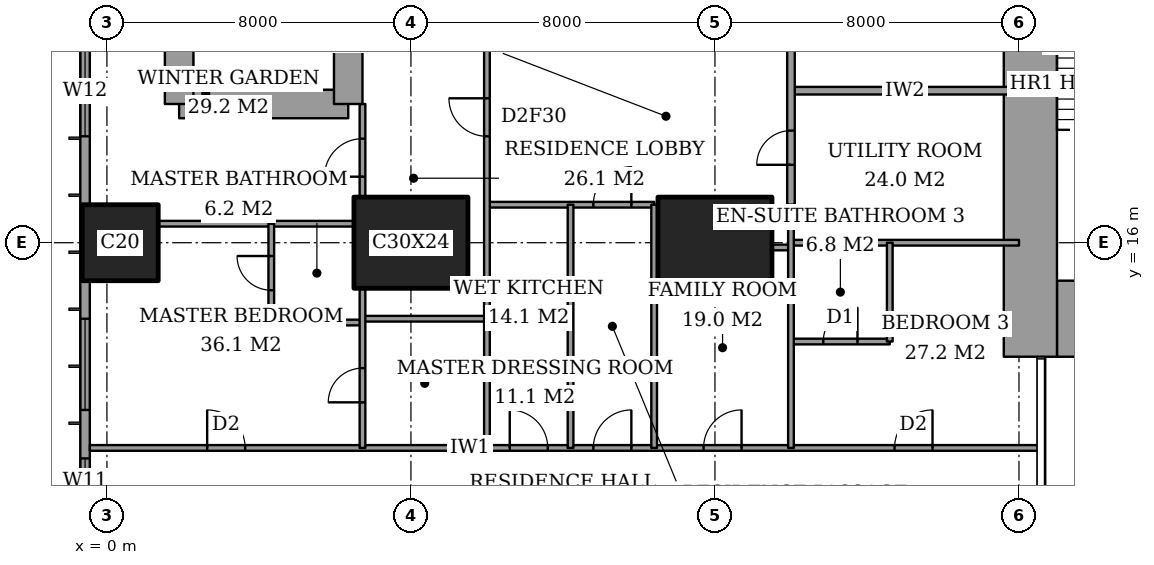
"""IFC4 building model, lengths in metres.
Left out: names, types, materials, properties, quantities, classifications, styles, units other than length and angle.
Written with IfcOpenShell. Run it as: python <this file> out.ifc"""

import sys

from ifc_helpers import new_model, si_unit, direction, frame, frame_2d, origin, origin_2d, place, context, subcontext, project, spatial, rectangle, extrude, element, fill, save


model = new_model("IFC4")
c1 = context("Model", 3, precision=1e-05, world=origin(), true_north=direction((0.0, 1.0)))
c2 = subcontext(c1, "Body", "Model", "MODEL_VIEW")
j1 = project(units=[si_unit("LENGTHUNIT", "METRE"), si_unit("PLANEANGLEUNIT", "RADIAN")], contexts=[c1])
p1 = place(None, origin())
s1 = spatial("IfcSite", under=j1, at=p1, CompositionType="ELEMENT")
p2 = place(p1, origin())
s2 = spatial("IfcBuilding", under=s1, at=p2, CompositionType="ELEMENT")
p3 = place(p2, frame((0.0, 0.0, 139.4)))
s3 = spatial("IfcBuildingStorey", under=s2, at=p3, CompositionType="ELEMENT", Elevation=139.4)
p4 = place(p3, frame((0.35, 16.0, 0.0), z_axis=(0.0, 0.0, 1.0), x_axis=(1.0, 0.0, 0.0)))
e1 = element("IfcColumn", 1, at=p4, inside=s3, PredefinedType="COLUMN", context=c2, shape_type="SweptSolid", body=[
    extrude(rectangle(XDim=2.0, YDim=2.0, at=origin_2d()), origin(), (0.0, 0.0, 1.0), 3.6),
])
for number, where, z_axis, x_axis in (
    (2, (8.0, 16.0, 0.0), (0.0, 0.0, 1.0), (1.0, 0.0, 0.0)),
    (3, (16.0, 16.0, 0.0), (0.0, 0.0, 1.0), (1.0, 0.0, 0.0)),
):
    element("IfcColumn", number, at=place(p3, frame(where, z_axis=z_axis, x_axis=x_axis)), inside=s3, PredefinedType="COLUMN", context=c2, shape_type="SweptSolid", body=[
        extrude(rectangle(XDim=3.0, YDim=2.4, at=origin_2d()), origin(), (0.0, 0.0, 1.0), 3.6),
    ])
p5 = place(p3, frame((25.0, 14.0, 0.0), z_axis=(0.0, 0.0, 1.0), x_axis=(1.0, 0.0, 0.0)))
e4 = element("IfcWall", 4, at=p5, inside=s3, PredefinedType="SHEAR", context=c2, shape_type="SweptSolid", body=[
    extrude(rectangle(XDim=3.15, YDim=2.0, at=frame_2d((1.575, 0.0))), origin(), (0.0, 0.0, 1.0), 3.6),
])
p6 = place(p3, frame((24.3, 13.0, 0.0), z_axis=(0.0, 0.0, 1.0), x_axis=(0.0, 1.0, 0.0)))
e5 = element("IfcWall", 5, at=p6, inside=s3, PredefinedType="SHEAR", context=c2, shape_type="SweptSolid", body=[
    extrude(rectangle(XDim=10.15, YDim=1.4, at=frame_2d((5.075, 0.0))), origin(), (0.0, 0.0, 1.0), 3.6),
])
p7 = place(p3, frame((1.9, 19.65, 0.0), z_axis=(0.0, 0.0, 1.0), x_axis=(1.0, 0.0, 0.0)))
e6 = element("IfcWall", 6, at=p7, inside=s3, PredefinedType="SHEAR", context=c2, shape_type="SweptSolid", body=[
    extrude(rectangle(XDim=4.45, YDim=0.75, at=frame_2d((2.225, 0.0))), origin(), (0.0, 0.0, 1.0), 3.6),
])
p8 = place(p3, frame((6.35, 19.65, 0.0), z_axis=(0.0, 0.0, 1.0), x_axis=(0.0, 1.0, 0.0)))
e7 = element("IfcWall", 7, at=p8, inside=s3, PredefinedType="SHEAR", context=c2, shape_type="SweptSolid", body=[
    extrude(rectangle(XDim=8.7, YDim=0.75, at=frame_2d((4.35, 0.0))), origin(), (0.0, 0.0, 1.0), 3.6),
])
p9 = place(p8, frame((6.725, 0.0, 0.0)))
e8 = element("IfcOpeningElement", 8, at=p9, cuts=e7, PredefinedType="OPENING", context=c2, shape_type="SweptSolid", body=[
    extrude(rectangle(XDim=1.0, YDim=2.1, at=frame_2d((0.5, 1.05))), frame((0.0, 0.385, 0.0), z_axis=(0.0, -1.0, 0.0), x_axis=(1.0, 0.0, 0.0)), (0.0, 0.0, 1.0), 0.77),
])
p10 = place(p3, frame((1.9, 28.35, 0.0), z_axis=(0.0, 0.0, 1.0), x_axis=(0.0, -1.0, 0.0)))
e9 = element("IfcWall", 9, at=p10, inside=s3, PredefinedType="SHEAR", context=c2, shape_type="SweptSolid", body=[
    extrude(rectangle(XDim=8.7, YDim=0.75, at=frame_2d((4.35, 0.0))), origin(), (0.0, 0.0, 1.0), 3.6),
])
p11 = place(p3, frame((-0.575, 44.825, 0.0), z_axis=(0.0, 0.0, 1.0), x_axis=(0.0, -1.0, 0.0)))
e10 = element("IfcWall", 10, at=p11, inside=s3, PredefinedType="SOLIDWALL", context=c2, shape_type="SweptSolid", body=[
    extrude(rectangle(XDim=41.65, YDim=0.25, at=frame_2d((20.825, 0.0))), origin(), (0.0, 0.0, 1.0), 3.6),
])
p12 = place(p11, frame((0.775, 0.0, 0.4)))
e11 = element("IfcOpeningElement", 11, at=p12, cuts=e10, PredefinedType="OPENING", context=c2, shape_type="SweptSolid", body=[
    extrude(rectangle(XDim=2.4, YDim=2.2, at=frame_2d((1.2, 1.1))), frame((0.0, 0.135, 0.0), z_axis=(0.0, -1.0, 0.0), x_axis=(1.0, 0.0, 0.0)), (0.0, 0.0, 1.0), 0.27),
])
p13 = place(p11, frame((6.1, 0.0, 0.4)))
e12 = element("IfcOpeningElement", 12, at=p13, cuts=e10, PredefinedType="OPENING", context=c2, shape_type="SweptSolid", body=[
    extrude(rectangle(XDim=1.2, YDim=2.2, at=frame_2d((0.6, 1.1))), frame((0.0, 0.135, 0.0), z_axis=(0.0, -1.0, 0.0), x_axis=(1.0, 0.0, 0.0)), (0.0, 0.0, 1.0), 0.27),
])
p14 = place(p11, frame((8.425, 0.0, 0.4)))
e13 = element("IfcOpeningElement", 13, at=p14, cuts=e10, PredefinedType="OPENING", context=c2, shape_type="SweptSolid", body=[
    extrude(rectangle(XDim=2.4, YDim=2.2, at=frame_2d((1.2, 1.1))), frame((0.0, 0.135, 0.0), z_axis=(0.0, -1.0, 0.0), x_axis=(1.0, 0.0, 0.0)), (0.0, 0.0, 1.0), 0.27),
])
p15 = place(p11, frame((15.625, 0.0, 0.4)))
e14 = element("IfcOpeningElement", 14, at=p15, cuts=e10, PredefinedType="OPENING", context=c2, shape_type="SweptSolid", body=[
    extrude(rectangle(XDim=2.4, YDim=2.2, at=frame_2d((1.2, 1.1))), frame((0.0, 0.135, 0.0), z_axis=(0.0, -1.0, 0.0), x_axis=(1.0, 0.0, 0.0)), (0.0, 0.0, 1.0), 0.27),
])
p16 = place(p11, frame((23.625, 0.0, 0.4)))
e15 = element("IfcOpeningElement", 15, at=p16, cuts=e10, PredefinedType="OPENING", context=c2, shape_type="SweptSolid", body=[
    extrude(rectangle(XDim=2.4, YDim=2.2, at=frame_2d((1.2, 1.1))), frame((0.0, 0.135, 0.0), z_axis=(0.0, -1.0, 0.0), x_axis=(1.0, 0.0, 0.0)), (0.0, 0.0, 1.0), 0.27),
])
p17 = place(p11, frame((30.825, 0.0, 0.4)))
e16 = element("IfcOpeningElement", 16, at=p17, cuts=e10, PredefinedType="OPENING", context=c2, shape_type="SweptSolid", body=[
    extrude(rectangle(XDim=2.4, YDim=2.2, at=frame_2d((1.2, 1.1))), frame((0.0, 0.135, 0.0), z_axis=(0.0, -1.0, 0.0), x_axis=(1.0, 0.0, 0.0)), (0.0, 0.0, 1.0), 0.27),
])
p18 = place(p11, frame((34.5, 0.0, 0.4)))
e17 = element("IfcOpeningElement", 17, at=p18, cuts=e10, PredefinedType="OPENING", context=c2, shape_type="SweptSolid", body=[
    extrude(rectangle(XDim=1.2, YDim=2.2, at=frame_2d((0.6, 1.1))), frame((0.0, 0.135, 0.0), z_axis=(0.0, -1.0, 0.0), x_axis=(1.0, 0.0, 0.0)), (0.0, 0.0, 1.0), 0.27),
])
p19 = place(p11, frame((38.475, 0.0, 0.4)))
e18 = element("IfcOpeningElement", 18, at=p19, cuts=e10, PredefinedType="OPENING", context=c2, shape_type="SweptSolid", body=[
    extrude(rectangle(XDim=2.4, YDim=2.2, at=frame_2d((1.2, 1.1))), frame((0.0, 0.135, 0.0), z_axis=(0.0, -1.0, 0.0), x_axis=(1.0, 0.0, 0.0)), (0.0, 0.0, 1.0), 0.27),
])
p20 = place(p3, frame((-0.45, 10.6, 0.0), z_axis=(0.0, 0.0, 1.0), x_axis=(1.0, 0.0, 0.0)))
e19 = element("IfcWall", 19, at=p20, inside=s3, PredefinedType="PARTITIONING", context=c2, shape_type="SweptSolid", body=[
    extrude(rectangle(XDim=25.011, YDim=0.15, at=frame_2d((12.505, 0.0))), origin(), (0.0, 0.0, 1.0), 3.35),
])
p21 = place(p20, frame((13.25, 0.0, 0.0)))
e20 = element("IfcOpeningElement", 20, at=p21, cuts=e19, PredefinedType="OPENING", context=c2, shape_type="SweptSolid", body=[
    extrude(rectangle(XDim=1.0, YDim=2.1, at=frame_2d((0.5, 1.05))), frame((0.0, 0.085, 0.0), z_axis=(0.0, -1.0, 0.0), x_axis=(1.0, 0.0, 0.0)), (0.0, 0.0, 1.0), 0.17),
])
p22 = place(p20, frame((3.087, 0.0, 0.0)))
e21 = element("IfcOpeningElement", 21, at=p22, cuts=e19, PredefinedType="OPENING", context=c2, shape_type="SweptSolid", body=[
    extrude(rectangle(XDim=1.0, YDim=2.1, at=frame_2d((0.5, 1.05))), frame((0.0, 0.085, 0.0), z_axis=(0.0, -1.0, 0.0), x_axis=(1.0, 0.0, 0.0)), (0.0, 0.0, 1.0), 0.17),
])
p23 = place(p20, frame((11.05, 0.0, 0.0)))
e22 = element("IfcOpeningElement", 22, at=p23, cuts=e19, PredefinedType="OPENING", context=c2, shape_type="SweptSolid", body=[
    extrude(rectangle(XDim=1.0, YDim=2.1, at=frame_2d((0.5, 1.05))), frame((0.0, 0.085, 0.0), z_axis=(0.0, -1.0, 0.0), x_axis=(1.0, 0.0, 0.0)), (0.0, 0.0, 1.0), 0.17),
])
p24 = place(p20, frame((16.15, 0.0, 0.0)))
e23 = element("IfcOpeningElement", 23, at=p24, cuts=e19, PredefinedType="OPENING", context=c2, shape_type="SweptSolid", body=[
    extrude(rectangle(XDim=1.0, YDim=2.1, at=frame_2d((0.5, 1.05))), frame((0.0, 0.085, 0.0), z_axis=(0.0, -1.0, 0.0), x_axis=(1.0, 0.0, 0.0)), (0.0, 0.0, 1.0), 0.17),
])
p25 = place(p20, frame((21.175, 0.0, 0.0)))
e24 = element("IfcOpeningElement", 24, at=p25, cuts=e19, PredefinedType="OPENING", context=c2, shape_type="SweptSolid", body=[
    extrude(rectangle(XDim=1.0, YDim=2.1, at=frame_2d((0.5, 1.05))), frame((0.0, 0.085, 0.0), z_axis=(0.0, -1.0, 0.0), x_axis=(1.0, 0.0, 0.0)), (0.0, 0.0, 1.0), 0.17),
])
p26 = place(p3, frame((18.0, 13.4, 0.0), z_axis=(0.0, 0.0, 1.0), x_axis=(1.0, 0.0, 0.0)))
e25 = element("IfcWall", 25, at=p26, inside=s3, PredefinedType="PARTITIONING", context=c2, shape_type="SweptSolid", body=[
    extrude(rectangle(XDim=2.6, YDim=0.15, at=frame_2d((1.3, 0.0))), origin(), (0.0, 0.0, 1.0), 3.35),
])
p27 = place(p26, frame((0.85, 0.0, 0.0)))
e26 = element("IfcOpeningElement", 26, at=p27, cuts=e25, PredefinedType="OPENING", context=c2, shape_type="SweptSolid", body=[
    extrude(rectangle(XDim=0.9, YDim=2.1, at=frame_2d((0.45, 1.05))), frame((0.0, 0.085, 0.0), z_axis=(0.0, -1.0, 0.0), x_axis=(1.0, 0.0, 0.0)), (0.0, 0.0, 1.0), 0.17),
])
p28 = place(p3, frame((4.325, 13.9, 0.0), z_axis=(0.0, 0.0, 1.0), x_axis=(1.0, 0.0, 0.0)))
e27 = element("IfcWall", 27, at=p28, inside=s3, PredefinedType="PARTITIONING", context=c2, shape_type="SweptSolid", body=[
    extrude(rectangle(XDim=2.4, YDim=0.15, at=frame_2d((1.2, 0.0))), origin(), (0.0, 0.0, 1.0), 3.35),
])
p29 = place(p3, frame((6.725, 14.0, 0.0), z_axis=(0.0, 0.0, 1.0), x_axis=(1.0, 0.0, 0.0)))
e28 = element("IfcWall", 28, at=p29, inside=s3, PredefinedType="PARTITIONING", context=c2, shape_type="SweptSolid", body=[
    extrude(rectangle(XDim=3.275, YDim=0.15, at=frame_2d((1.637, 0.0))), origin(), (0.0, 0.0, 1.0), 3.35),
])
p30 = place(p3, frame((17.5, 15.875, 0.0), z_axis=(0.0, 0.0, 1.0), x_axis=(1.0, 0.0, 0.0)))
e29 = element("IfcWall", 29, at=p30, inside=s3, PredefinedType="PARTITIONING", context=c2, shape_type="SweptSolid", body=[
    extrude(rectangle(XDim=0.5, YDim=0.15, at=frame_2d((0.25, 0.0))), origin(), (0.0, 0.0, 1.0), 2.634),
])
p31 = place(p3, frame((18.0, 16.0, 0.0), z_axis=(0.0, 0.0, 1.0), x_axis=(1.0, 0.0, 0.0)))
e30 = element("IfcWall", 30, at=p31, inside=s3, PredefinedType="PARTITIONING", context=c2, shape_type="SweptSolid", body=[
    extrude(rectangle(XDim=6.0, YDim=0.15, at=frame_2d((3.0, 0.0))), origin(), (0.0, 0.0, 1.0), 2.634),
])
p32 = place(p3, frame((1.35, 16.5, 0.0), z_axis=(0.0, 0.0, 1.0), x_axis=(1.0, 0.0, 0.0)))
e31 = element("IfcWall", 31, at=p32, inside=s3, PredefinedType="PARTITIONING", context=c2, shape_type="SweptSolid", body=[
    extrude(rectangle(XDim=5.15, YDim=0.15, at=frame_2d((2.575, 0.0))), origin(), (0.0, 0.0, 1.0), 3.35),
])
p33 = place(p3, frame((10.0, 17.0, 0.0), z_axis=(0.0, 0.0, 1.0), x_axis=(1.0, 0.0, 0.0)))
e32 = element("IfcWall", 32, at=p33, inside=s3, PredefinedType="PARTITIONING", context=c2, shape_type="SweptSolid", body=[
    extrude(rectangle(XDim=4.4, YDim=0.15, at=frame_2d((2.2, 0.0))), origin(), (0.0, 0.0, 1.0), 3.35),
])
p34 = place(p33, frame((2.8, 0.0, 0.0)))
e33 = element("IfcOpeningElement", 33, at=p34, cuts=e32, PredefinedType="OPENING", context=c2, shape_type="SweptSolid", body=[
    extrude(rectangle(XDim=1.0, YDim=2.1, at=frame_2d((0.5, 1.05))), frame((0.0, 0.085, 0.0), z_axis=(0.0, -1.0, 0.0), x_axis=(1.0, 0.0, 0.0)), (0.0, 0.0, 1.0), 0.17),
])
p35 = place(p3, frame((18.0, 20.0, 0.0), z_axis=(0.0, 0.0, 1.0), x_axis=(1.0, 0.0, 0.0)))
e34 = element("IfcWall", 34, at=p35, inside=s3, PredefinedType="PARTITIONING", context=c2, shape_type="SweptSolid", body=[
    extrude(rectangle(XDim=6.0, YDim=0.2, at=frame_2d((3.0, 0.0))), origin(), (0.0, 0.0, 1.0), 3.35),
])
p36 = place(p3, frame((4.325, 13.9, 0.0), z_axis=(0.0, 0.0, 1.0), x_axis=(0.0, 1.0, 0.0)))
e35 = element("IfcWall", 35, at=p36, inside=s3, PredefinedType="PARTITIONING", context=c2, shape_type="SweptSolid", body=[
    extrude(rectangle(XDim=2.6, YDim=0.15, at=frame_2d((1.3, 0.0))), origin(), (0.0, 0.0, 1.0), 3.35),
])
p37 = place(p36, frame((0.85, 0.0, 0.0)))
e36 = element("IfcOpeningElement", 36, at=p37, cuts=e35, PredefinedType="OPENING", context=c2, shape_type="SweptSolid", body=[
    extrude(rectangle(XDim=0.9, YDim=2.1, at=frame_2d((0.45, 1.05))), frame((0.0, 0.085, 0.0), z_axis=(0.0, -1.0, 0.0), x_axis=(1.0, 0.0, 0.0)), (0.0, 0.0, 1.0), 0.17),
])
p38 = place(p3, frame((6.725, 10.6, 0.0), z_axis=(0.0, 0.0, 1.0), x_axis=(0.0, 1.0, 0.0)))
e37 = element("IfcWall", 37, at=p38, inside=s3, PredefinedType="PARTITIONING", context=c2, shape_type="SweptSolid", body=[
    extrude(rectangle(XDim=4.2, YDim=0.15, at=frame_2d((2.1, 0.0))), origin(), (0.0, 0.0, 1.0), 3.35),
])
p39 = place(p38, frame((1.2, 0.0, 0.0)))
e38 = element("IfcOpeningElement", 38, at=p39, cuts=e37, PredefinedType="OPENING", context=c2, shape_type="SweptSolid", body=[
    extrude(rectangle(XDim=0.9, YDim=2.1, at=frame_2d((0.45, 1.05))), frame((0.0, 0.085, 0.0), z_axis=(0.0, -1.0, 0.0), x_axis=(1.0, 0.0, 0.0)), (0.0, 0.0, 1.0), 0.17),
])
p40 = place(p3, frame((6.725, 17.2, 0.0), z_axis=(0.0, 0.0, 1.0), x_axis=(0.0, 1.0, 0.0)))
e39 = element("IfcWall", 39, at=p40, inside=s3, PredefinedType="PARTITIONING", context=c2, shape_type="SweptSolid", body=[
    extrude(rectangle(XDim=2.45, YDim=0.15, at=frame_2d((1.225, 0.0))), origin(), (0.0, 0.0, 1.0), 3.35),
])
p41 = place(p40, frame((0.538, 0.0, 0.0)))
e40 = element("IfcOpeningElement", 40, at=p41, cuts=e39, PredefinedType="OPENING", context=c2, shape_type="SweptSolid", body=[
    extrude(rectangle(XDim=1.0, YDim=2.1, at=frame_2d((0.5, 1.05))), frame((0.0, 0.085, 0.0), z_axis=(0.0, -1.0, 0.0), x_axis=(1.0, 0.0, 0.0)), (0.0, 0.0, 1.0), 0.17),
])
p42 = place(p3, frame((10.0, 10.6, 0.0), z_axis=(0.0, 0.0, 1.0), x_axis=(0.0, 1.0, 0.0)))
e41 = element("IfcWall", 41, at=p42, inside=s3, PredefinedType="PARTITIONING", context=c2, shape_type="SweptSolid", body=[
    extrude(rectangle(XDim=11.0, YDim=0.15, at=frame_2d((5.5, 0.0))), origin(), (0.0, 0.0, 1.0), 3.35),
])
p43 = place(p42, frame((8.2, 0.0, 0.0)))
e42 = element("IfcOpeningElement", 42, at=p43, cuts=e41, PredefinedType="OPENING", context=c2, shape_type="SweptSolid", body=[
    extrude(rectangle(XDim=1.0, YDim=2.1, at=frame_2d((0.5, 1.05))), frame((0.0, 0.085, 0.0), z_axis=(0.0, -1.0, 0.0), x_axis=(1.0, 0.0, 0.0)), (0.0, 0.0, 1.0), 0.17),
])
for number, where, z_axis, x_axis in (
    (43, (12.2, 10.6, 0.0), (0.0, 0.0, 1.0), (0.0, 1.0, 0.0)),
    (44, (14.4, 10.6, 0.0), (0.0, 0.0, 1.0), (0.0, 1.0, 0.0)),
):
    element("IfcWall", number, at=place(p3, frame(where, z_axis=z_axis, x_axis=x_axis)), inside=s3, PredefinedType="PARTITIONING", context=c2, shape_type="SweptSolid", body=[
        extrude(rectangle(XDim=6.4, YDim=0.15, at=frame_2d((3.2, 0.0))), origin(), (0.0, 0.0, 1.0), 3.35),
    ])
p44 = place(p3, frame((18.0, 17.0, 0.0), z_axis=(0.0, 0.0, 1.0), x_axis=(0.0, 1.0, 0.0)))
e45 = element("IfcWall", 45, at=p44, inside=s3, PredefinedType="PARTITIONING", context=c2, shape_type="SweptSolid", body=[
    extrude(rectangle(XDim=7.0, YDim=0.2, at=frame_2d((3.5, 0.0))), origin(), (0.0, 0.0, 1.0), 3.35),
])
p45 = place(p44, frame((4.4, 0.0, 0.0)))
e46 = element("IfcOpeningElement", 46, at=p45, cuts=e45, PredefinedType="OPENING", context=c2, shape_type="SweptSolid", body=[
    extrude(rectangle(XDim=1.2, YDim=2.4, at=frame_2d((0.6, 1.2))), frame((0.0, 0.11, 0.0), z_axis=(0.0, -1.0, 0.0), x_axis=(1.0, 0.0, 0.0)), (0.0, 0.0, 1.0), 0.22),
])
p46 = place(p44, frame((1.05, 0.0, 0.0)))
e47 = element("IfcOpeningElement", 47, at=p46, cuts=e45, PredefinedType="OPENING", context=c2, shape_type="SweptSolid", body=[
    extrude(rectangle(XDim=0.9, YDim=2.1, at=frame_2d((0.45, 1.05))), frame((0.0, 0.11, 0.0), z_axis=(0.0, -1.0, 0.0), x_axis=(1.0, 0.0, 0.0)), (0.0, 0.0, 1.0), 0.22),
])
p47 = place(p3, frame((18.0, 10.6, 0.0), z_axis=(0.0, 0.0, 1.0), x_axis=(0.0, 1.0, 0.0)))
e48 = element("IfcWall", 48, at=p47, inside=s3, PredefinedType="PARTITIONING", context=c2, shape_type="SweptSolid", body=[
    extrude(rectangle(XDim=6.4, YDim=0.15, at=frame_2d((3.2, 0.0))), origin(), (0.0, 0.0, 1.0), 3.35),
])
p48 = place(p3, frame((20.6, 13.4, 0.0), z_axis=(0.0, 0.0, 1.0), x_axis=(0.0, 1.0, 0.0)))
e49 = element("IfcWall", 49, at=p48, inside=s3, PredefinedType="PARTITIONING", context=c2, shape_type="SweptSolid", body=[
    extrude(rectangle(XDim=2.6, YDim=0.15, at=frame_2d((1.3, 0.0))), origin(), (0.0, 0.0, 1.0), 3.35),
])
p49 = place(p16, origin())
e50 = element("IfcWindow", 50, at=p49, inside=s3, PartitioningType="SINGLE_PANEL", PredefinedType="WINDOW", context=c2, shape_type="SweptSolid", body=[
    extrude(rectangle(XDim=2.4, YDim=2.2, at=frame_2d((1.2, 1.1))), frame((0.0, 0.03, 0.0), z_axis=(0.0, -1.0, 0.0), x_axis=(1.0, 0.0, 0.0)), (0.0, 0.0, 1.0), 0.06),
])
fill(e15, e50)
p50 = place(p17, origin())
e51 = element("IfcWindow", 51, at=p50, inside=s3, PartitioningType="SINGLE_PANEL", PredefinedType="WINDOW", context=c2, shape_type="SweptSolid", body=[
    extrude(rectangle(XDim=2.4, YDim=2.2, at=frame_2d((1.2, 1.1))), frame((0.0, 0.03, 0.0), z_axis=(0.0, -1.0, 0.0), x_axis=(1.0, 0.0, 0.0)), (0.0, 0.0, 1.0), 0.06),
])
fill(e16, e51)
p51 = place(p18, origin())
e52 = element("IfcWindow", 52, at=p51, inside=s3, PartitioningType="SINGLE_PANEL", PredefinedType="WINDOW", context=c2, shape_type="SweptSolid", body=[
    extrude(rectangle(XDim=1.2, YDim=2.2, at=frame_2d((0.6, 1.1))), frame((0.0, 0.03, 0.0), z_axis=(0.0, -1.0, 0.0), x_axis=(1.0, 0.0, 0.0)), (0.0, 0.0, 1.0), 0.06),
])
fill(e17, e52)
p52 = place(p21, origin())
e53 = element("IfcDoor", 53, at=p52, inside=s3, OperationType="SINGLE_SWING_LEFT", PredefinedType="DOOR", context=c2, shape_type="SweptSolid", body=[
    extrude(rectangle(XDim=1.0, YDim=2.1, at=frame_2d((0.5, 1.05))), frame((0.0, 0.025, 0.0), z_axis=(0.0, -1.0, 0.0), x_axis=(1.0, 0.0, 0.0)), (0.0, 0.0, 1.0), 0.05),
])
fill(e20, e53)
p53 = place(p37, origin())
e54 = element("IfcDoor", 54, at=p53, inside=s3, OperationType="SINGLE_SWING_LEFT", PredefinedType="DOOR", context=c2, shape_type="SweptSolid", body=[
    extrude(rectangle(XDim=0.9, YDim=2.1, at=frame_2d((0.45, 1.05))), frame((0.0, 0.025, 0.0), z_axis=(0.0, -1.0, 0.0), x_axis=(1.0, 0.0, 0.0)), (0.0, 0.0, 1.0), 0.05),
])
fill(e36, e54)
p54 = place(p22, origin())
e55 = element("IfcDoor", 55, at=p54, inside=s3, OperationType="SINGLE_SWING_RIGHT", PredefinedType="DOOR", context=c2, shape_type="SweptSolid", body=[
    extrude(rectangle(XDim=1.0, YDim=2.1, at=frame_2d((0.5, 1.05))), frame((0.0, 0.025, 0.0), z_axis=(0.0, -1.0, 0.0), x_axis=(1.0, 0.0, 0.0)), (0.0, 0.0, 1.0), 0.05),
])
fill(e21, e55)
p55 = place(p41, origin())
e56 = element("IfcDoor", 56, at=p55, inside=s3, OperationType="SINGLE_SWING_RIGHT", PredefinedType="DOOR", context=c2, shape_type="SweptSolid", body=[
    extrude(rectangle(XDim=1.0, YDim=2.1, at=frame_2d((0.5, 1.05))), frame((0.0, 0.025, 0.0), z_axis=(0.0, -1.0, 0.0), x_axis=(1.0, 0.0, 0.0)), (0.0, 0.0, 1.0), 0.05),
])
fill(e40, e56)
p56 = place(p39, origin())
e57 = element("IfcDoor", 57, at=p56, inside=s3, OperationType="SINGLE_SWING_RIGHT", PredefinedType="DOOR", context=c2, shape_type="SweptSolid", body=[
    extrude(rectangle(XDim=0.9, YDim=2.1, at=frame_2d((0.45, 1.05))), frame((0.0, 0.025, 0.0), z_axis=(0.0, -1.0, 0.0), x_axis=(1.0, 0.0, 0.0)), (0.0, 0.0, 1.0), 0.05),
])
fill(e38, e57)
p57 = place(p43, origin())
e58 = element("IfcDoor", 58, at=p57, inside=s3, OperationType="SINGLE_SWING_LEFT", PredefinedType="DOOR", context=c2, shape_type="SweptSolid", body=[
    extrude(rectangle(XDim=1.0, YDim=2.1, at=frame_2d((0.5, 1.05))), frame((0.0, 0.025, 0.0), z_axis=(0.0, -1.0, 0.0), x_axis=(1.0, 0.0, 0.0)), (0.0, 0.0, 1.0), 0.05),
])
fill(e42, e58)
p58 = place(p23, origin())
e59 = element("IfcDoor", 59, at=p58, inside=s3, OperationType="SINGLE_SWING_RIGHT", PredefinedType="DOOR", context=c2, shape_type="SweptSolid", body=[
    extrude(rectangle(XDim=1.0, YDim=2.1, at=frame_2d((0.5, 1.05))), frame((0.0, 0.025, 0.0), z_axis=(0.0, -1.0, 0.0), x_axis=(1.0, 0.0, 0.0)), (0.0, 0.0, 1.0), 0.05),
])
fill(e22, e59)
p59 = place(p34, origin())
e60 = element("IfcDoor", 60, at=p59, inside=s3, OperationType="SINGLE_SWING_LEFT", PredefinedType="DOOR", context=c2, shape_type="SweptSolid", body=[
    extrude(rectangle(XDim=1.0, YDim=2.1, at=frame_2d((0.5, 1.05))), frame((0.0, 0.025, 0.0), z_axis=(0.0, -1.0, 0.0), x_axis=(1.0, 0.0, 0.0)), (0.0, 0.0, 1.0), 0.05),
])
fill(e33, e60)
p60 = place(p24, origin())
e61 = element("IfcDoor", 61, at=p60, inside=s3, OperationType="SINGLE_SWING_LEFT", PredefinedType="DOOR", context=c2, shape_type="SweptSolid", body=[
    extrude(rectangle(XDim=1.0, YDim=2.1, at=frame_2d((0.5, 1.05))), frame((0.0, 0.025, 0.0), z_axis=(0.0, -1.0, 0.0), x_axis=(1.0, 0.0, 0.0)), (0.0, 0.0, 1.0), 0.05),
])
fill(e23, e61)
p61 = place(p27, origin())
e62 = element("IfcDoor", 62, at=p61, inside=s3, OperationType="SINGLE_SWING_LEFT", PredefinedType="DOOR", context=c2, shape_type="SweptSolid", body=[
    extrude(rectangle(XDim=0.9, YDim=2.1, at=frame_2d((0.45, 1.05))), frame((0.0, 0.025, 0.0), z_axis=(0.0, -1.0, 0.0), x_axis=(1.0, 0.0, 0.0)), (0.0, 0.0, 1.0), 0.05),
])
fill(e26, e62)
p62 = place(p25, origin())
e63 = element("IfcDoor", 63, at=p62, inside=s3, OperationType="SINGLE_SWING_LEFT", PredefinedType="DOOR", context=c2, shape_type="SweptSolid", body=[
    extrude(rectangle(XDim=1.0, YDim=2.1, at=frame_2d((0.5, 1.05))), frame((0.0, 0.025, 0.0), z_axis=(0.0, -1.0, 0.0), x_axis=(1.0, 0.0, 0.0)), (0.0, 0.0, 1.0), 0.05),
])
fill(e24, e63)
p63 = place(p46, origin())
e64 = element("IfcDoor", 64, at=p63, inside=s3, OperationType="SINGLE_SWING_RIGHT", PredefinedType="DOOR", context=c2, shape_type="SweptSolid", body=[
    extrude(rectangle(XDim=0.9, YDim=2.1, at=frame_2d((0.45, 1.05))), frame((0.0, 0.025, 0.0), z_axis=(0.0, -1.0, 0.0), x_axis=(1.0, 0.0, 0.0)), (0.0, 0.0, 1.0), 0.05),
])
fill(e47, e64)
save(model, sys.argv[1])
